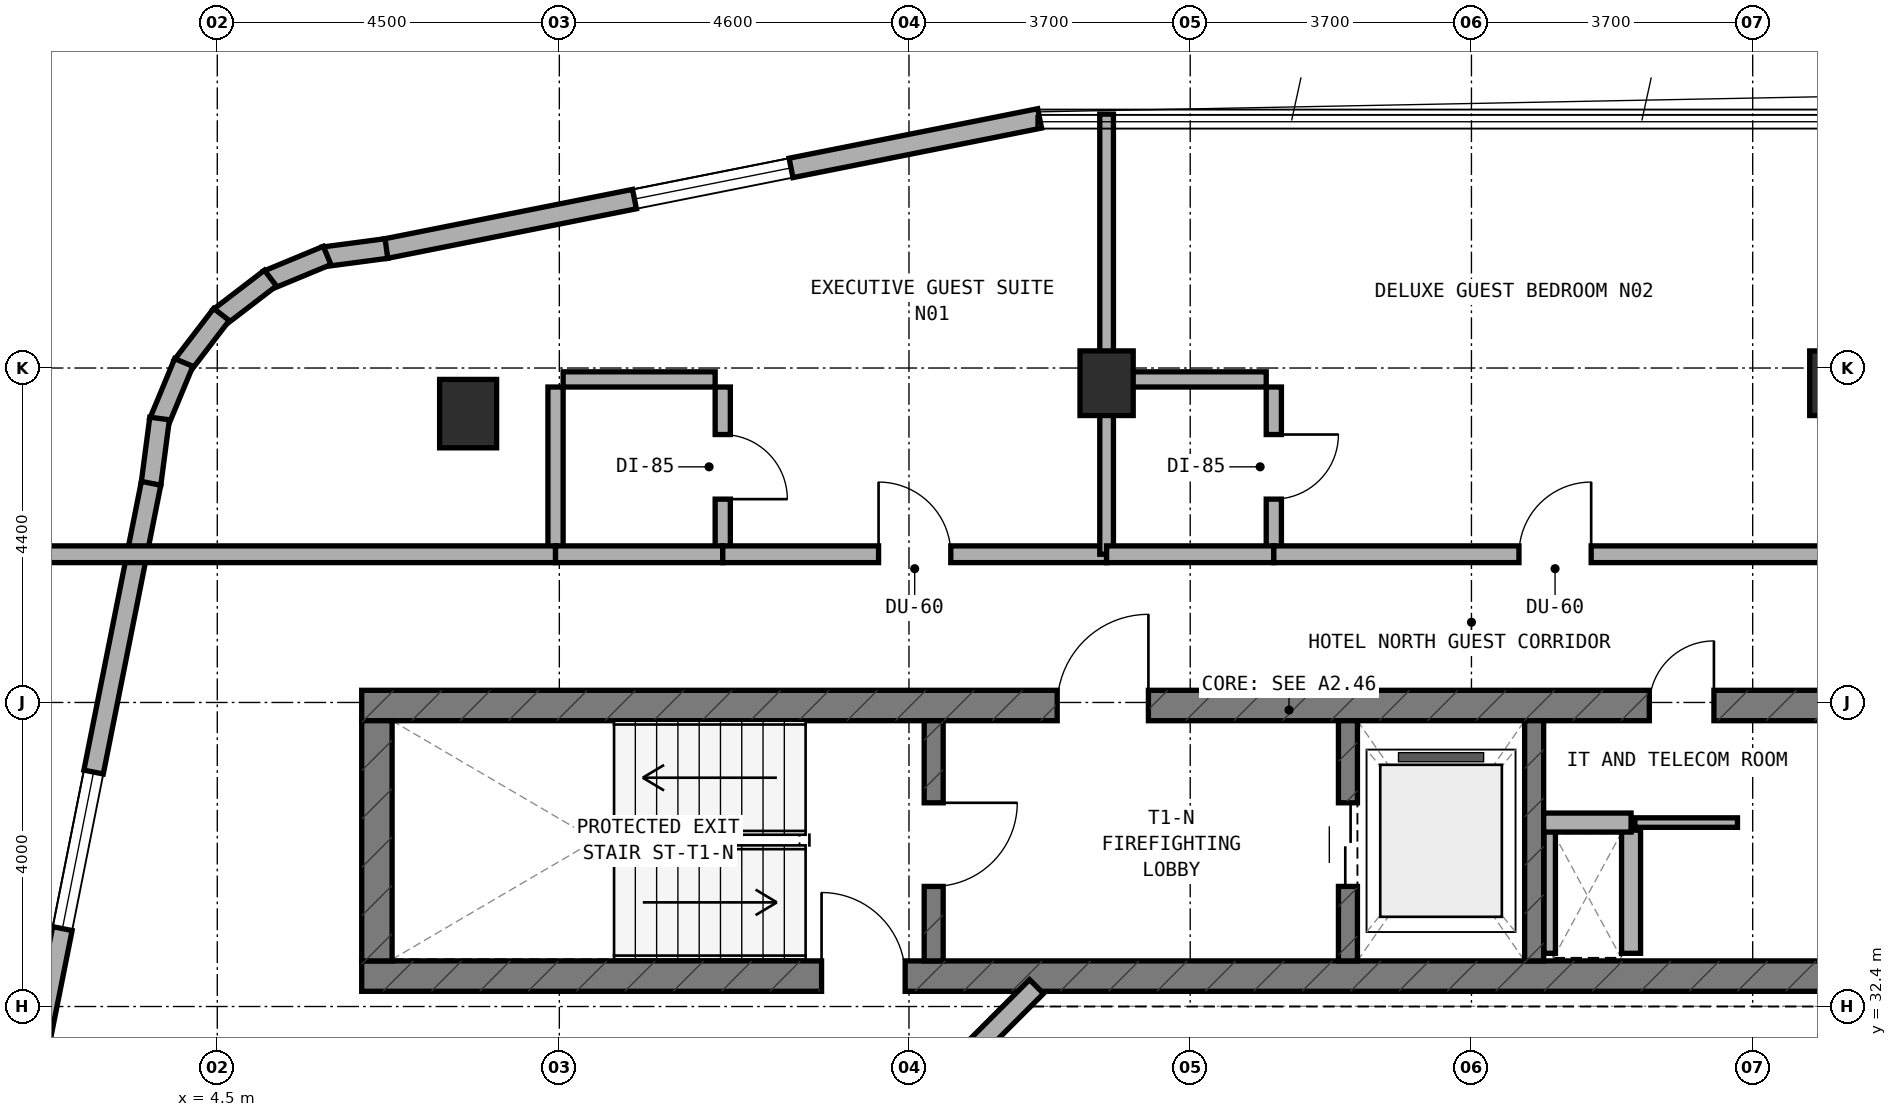
"""IFC4 building model, lengths in metres.
Left out: names, types, materials, properties, quantities, classifications, styles, units other than length and angle.
Written with IfcOpenShell. Run it as: python <this file> out.ifc"""

import sys

from ifc_helpers import new_model, si_unit, direction, frame, frame_2d, origin, origin_2d, place, context, subcontext, project, spatial, rectangle, extrude, element, fill, save


model = new_model("IFC4")
c1 = context("Model", 3, precision=1e-05, world=origin(), true_north=direction((0.0, 1.0)))
c2 = subcontext(c1, "Body", "Model", "MODEL_VIEW")
j1 = project(units=[si_unit("LENGTHUNIT", "METRE"), si_unit("PLANEANGLEUNIT", "RADIAN")], contexts=[c1])
p1 = place(None, origin())
s1 = spatial("IfcSite", under=j1, at=p1, CompositionType="ELEMENT")
p2 = place(p1, origin())
s2 = spatial("IfcBuilding", under=s1, at=p2, CompositionType="ELEMENT")
p3 = place(p2, frame((0.0, 0.0, 217.1)))
s3 = spatial("IfcBuildingStorey", under=s2, at=p3, CompositionType="ELEMENT", Elevation=217.1)
p4 = place(p3, frame((6.4, 32.8, 0.0), z_axis=(0.0, 0.0, 1.0), x_axis=(1.0, 0.0, 0.0)))
e1 = element("IfcWall", 1, at=p4, inside=s3, PredefinedType="SHEAR", context=c2, shape_type="SweptSolid", body=[
    extrude(rectangle(XDim=24.4, YDim=0.4, at=frame_2d((12.2, 0.0))), origin(), (0.0, 0.0, 1.0), 3.6),
])
p5 = place(p4, frame((6.05, 0.0, 0.0)))
e2 = element("IfcOpeningElement", 2, at=p5, cuts=e1, PredefinedType="OPENING", context=c2, shape_type="SweptSolid", body=[
    extrude(rectangle(XDim=1.1, YDim=2.15, at=frame_2d((0.55, 1.075))), frame((0.0, 0.21, 0.0), z_axis=(0.0, -1.0, 0.0), x_axis=(1.0, 0.0, 0.0)), (0.0, 0.0, 1.0), 0.42),
])
p6 = place(p3, frame((6.4, 36.36, 0.0), z_axis=(0.0, 0.0, 1.0), x_axis=(1.0, 0.0, 0.0)))
e3 = element("IfcWall", 3, at=p6, inside=s3, PredefinedType="SHEAR", context=c2, shape_type="SweptSolid", body=[
    extrude(rectangle(XDim=24.4, YDim=0.4, at=frame_2d((12.2, 0.0))), origin(), (0.0, 0.0, 1.0), 3.6),
])
p7 = place(p6, frame((9.15, 0.0, 0.0)))
e4 = element("IfcOpeningElement", 4, at=p7, cuts=e3, PredefinedType="OPENING", context=c2, shape_type="SweptSolid", body=[
    extrude(rectangle(XDim=1.2, YDim=2.15, at=frame_2d((0.6, 1.075))), frame((0.0, 0.21, 0.0), z_axis=(0.0, -1.0, 0.0), x_axis=(1.0, 0.0, 0.0)), (0.0, 0.0, 1.0), 0.42),
])
p8 = place(p6, frame((19.2, 0.0, 0.0)))
e5 = element("IfcOpeningElement", 5, at=p8, cuts=e3, PredefinedType="OPENING", context=c2, shape_type="SweptSolid", body=[
    extrude(rectangle(XDim=0.85, YDim=2.1, at=frame_2d((0.425, 1.05))), frame((0.0, 0.21, 0.0), z_axis=(0.0, -1.0, 0.0), x_axis=(1.0, 0.0, 0.0)), (0.0, 0.0, 1.0), 0.42),
])
p9 = place(p6, frame((16.94, 0.0, 0.0)))
e6 = element("IfcOpeningElement", 6, at=p9, cuts=e3, PredefinedType="OPENING", context=c2, shape_type="SweptSolid", body=[
    extrude(rectangle(XDim=0.85, YDim=2.1, at=frame_2d((0.425, 1.05))), frame((0.0, 0.21, 0.0), z_axis=(0.0, -1.0, 0.0), x_axis=(1.0, 0.0, 0.0)), (0.0, 0.0, 1.0), 0.42),
])
p10 = place(p3, frame((6.6, 33.0, 0.0), z_axis=(0.0, 0.0, 1.0), x_axis=(0.0, 1.0, 0.0)))
e7 = element("IfcWall", 7, at=p10, inside=s3, PredefinedType="SHEAR", context=c2, shape_type="SweptSolid", body=[
    extrude(rectangle(XDim=3.16, YDim=0.4, at=frame_2d((1.58, 0.0))), origin(), (0.0, 0.0, 1.0), 3.6),
])
p11 = place(p3, frame((13.925, 33.0, 0.0), z_axis=(0.0, 0.0, 1.0), x_axis=(0.0, 1.0, 0.0)))
e8 = element("IfcWall", 8, at=p11, inside=s3, PredefinedType="STANDARD", context=c2, shape_type="SweptSolid", body=[
    extrude(rectangle(XDim=3.16, YDim=0.25, at=frame_2d((1.58, 0.0))), origin(), (0.0, 0.0, 1.0), 3.32),
])
p12 = place(p11, frame((0.98, 0.0, 0.0)))
e9 = element("IfcOpeningElement", 9, at=p12, cuts=e8, PredefinedType="OPENING", context=c2, shape_type="SweptSolid", body=[
    extrude(rectangle(XDim=1.1, YDim=2.15, at=frame_2d((0.55, 1.075))), frame((0.0, 0.135, 0.0), z_axis=(0.0, -1.0, 0.0), x_axis=(1.0, 0.0, 0.0)), (0.0, 0.0, 1.0), 0.27),
])
p13 = place(p3, frame((19.375, 33.0, 0.0), z_axis=(0.0, 0.0, 1.0), x_axis=(0.0, 1.0, 0.0)))
e10 = element("IfcWall", 10, at=p13, inside=s3, PredefinedType="STANDARD", context=c2, shape_type="SweptSolid", body=[
    extrude(rectangle(XDim=3.16, YDim=0.25, at=frame_2d((1.58, 0.0))), origin(), (0.0, 0.0, 1.0), 3.32),
])
p14 = place(p13, frame((0.98, 0.0, 0.0)))
e11 = element("IfcOpeningElement", 11, at=p14, cuts=e10, PredefinedType="OPENING", context=c2, shape_type="SweptSolid", body=[
    extrude(rectangle(XDim=1.1, YDim=2.15, at=frame_2d((0.55, 1.075))), frame((0.0, 0.135, 0.0), z_axis=(0.0, -1.0, 0.0), x_axis=(1.0, 0.0, 0.0)), (0.0, 0.0, 1.0), 0.27),
])
p15 = place(p3, frame((21.825, 33.0, 0.0), z_axis=(0.0, 0.0, 1.0), x_axis=(0.0, 1.0, 0.0)))
e12 = element("IfcWall", 12, at=p15, inside=s3, PredefinedType="STANDARD", context=c2, shape_type="SweptSolid", body=[
    extrude(rectangle(XDim=3.16, YDim=0.25, at=frame_2d((1.58, 0.0))), origin(), (0.0, 0.0, 1.0), 3.32),
])
for number, where, z_axis, x_axis in (
    (13, (16.2, 40.6, 0.0), (0.0, 0.0, 1.0), (1.0, 0.0, 0.0)),
    (14, (25.8, 40.6, 0.0), (0.0, 0.0, 1.0), (1.0, 0.0, 0.0)),
):
    element("IfcColumn", number, at=place(p3, frame(where, z_axis=z_axis, x_axis=x_axis)), inside=s3, PredefinedType="COLUMN", context=c2, shape_type="SweptSolid", body=[
        extrude(rectangle(XDim=0.7, YDim=0.85, at=origin_2d()), origin(), (0.0, 0.0, 1.0), 3.6),
    ])
p16 = place(p3, frame((7.8, 40.2, 0.0), z_axis=(0.0, 0.0, 1.0), x_axis=(1.0, 0.0, 0.0)))
e15 = element("IfcColumn", 15, at=p16, inside=s3, PredefinedType="COLUMN", context=c2, shape_type="SweptSolid", body=[
    extrude(rectangle(XDim=0.75, YDim=0.9, at=origin_2d()), origin(), (0.0, 0.0, 1.0), 3.6),
])
p17 = place(p3, frame((15.319, 44.084, 0.0), z_axis=(0.0, 0.0, 1.0), x_axis=(-0.980745199176, -0.195291715883, 0.0)))
e16 = element("IfcWall", 16, at=p17, inside=s3, PredefinedType="STANDARD", context=c2, shape_type="SweptSolid", body=[
    extrude(rectangle(XDim=8.771, YDim=0.26, at=frame_2d((4.385, 0.0))), origin(), (0.0, 0.0, 1.0), 3.32),
])
p18 = place(p17, frame((3.335, 0.0, 0.85)))
e17 = element("IfcOpeningElement", 17, at=p18, cuts=e16, PredefinedType="OPENING", context=c2, shape_type="SweptSolid", body=[
    extrude(rectangle(XDim=2.1, YDim=1.5, at=frame_2d((1.05, 0.75))), frame((0.0, 0.14, 0.0), z_axis=(0.0, -1.0, 0.0), x_axis=(1.0, 0.0, 0.0)), (0.0, 0.0, 1.0), 0.28),
])
p19 = place(p3, frame((6.725, 42.372, 0.0), z_axis=(0.0, 0.0, 1.0), x_axis=(-0.9913883573, -0.130954667764, 0.0)))
e18 = element("IfcWall", 18, at=p19, inside=s3, PredefinedType="STANDARD", context=c2, shape_type="SweptSolid", body=[
    extrude(rectangle(XDim=0.833, YDim=0.26, at=frame_2d((0.417, 0.0))), origin(), (0.0, 0.0, 1.0), 3.32),
])
p20 = place(p3, frame((5.945, 42.281, 0.0), z_axis=(0.0, 0.0, 1.0), x_axis=(-0.923754491172, -0.382985169477, 0.0)))
e19 = element("IfcWall", 19, at=p20, inside=s3, PredefinedType="STANDARD", context=c2, shape_type="SweptSolid", body=[
    extrude(rectangle(XDim=0.851, YDim=0.26, at=frame_2d((0.426, 0.0))), origin(), (0.0, 0.0, 1.0), 3.32),
])
for number, where, z_axis, x_axis in (
    (20, (5.199, 41.983, 0.0), (0.0, 0.0, 1.0), (-0.794, -0.608, 0.0)),
    (21, (4.555, 41.504, 0.0), (0.0, 0.0, 1.0), (-0.608, -0.794, 0.0)),
):
    element("IfcWall", number, at=place(p3, frame(where, z_axis=z_axis, x_axis=x_axis)), inside=s3, PredefinedType="STANDARD", context=c2, shape_type="SweptSolid", body=[
        extrude(rectangle(XDim=0.85, YDim=0.26, at=frame_2d((0.425, 0.0))), origin(), (0.0, 0.0, 1.0), 3.32),
    ])
p21 = place(p3, frame((4.059, 40.873, 0.0), z_axis=(0.0, 0.0, 1.0), x_axis=(-0.383229930484, -0.923652976167, 0.0)))
e22 = element("IfcWall", 22, at=p21, inside=s3, PredefinedType="STANDARD", context=c2, shape_type="SweptSolid", body=[
    extrude(rectangle(XDim=0.851, YDim=0.26, at=frame_2d((0.426, 0.0))), origin(), (0.0, 0.0, 1.0), 3.32),
])
p22 = place(p3, frame((3.741, 40.136, 0.0), z_axis=(0.0, 0.0, 1.0), x_axis=(-0.130156359936, -0.991493480548, 0.0)))
e23 = element("IfcWall", 23, at=p22, inside=s3, PredefinedType="STANDARD", context=c2, shape_type="SweptSolid", body=[
    extrude(rectangle(XDim=0.868, YDim=0.26, at=frame_2d((0.434, 0.0))), origin(), (0.0, 0.0, 1.0), 3.32),
])
p23 = place(p3, frame((3.629, 39.283, 0.0), z_axis=(0.0, 0.0, 1.0), x_axis=(-0.195291715883, -0.980745199176, 0.0)))
e24 = element("IfcWall", 24, at=p23, inside=s3, PredefinedType="STANDARD", context=c2, shape_type="SweptSolid", body=[
    extrude(rectangle(XDim=8.771, YDim=0.26, at=frame_2d((4.385, 0.0))), origin(), (0.0, 0.0, 1.0), 3.32),
])
p24 = place(p23, frame((3.873, 0.0, 0.85)))
e25 = element("IfcOpeningElement", 25, at=p24, cuts=e24, PredefinedType="OPENING", context=c2, shape_type="SweptSolid", body=[
    extrude(rectangle(XDim=2.1, YDim=1.5, at=frame_2d((1.05, 0.75))), frame((0.0, 0.14, 0.0), z_axis=(0.0, -1.0, 0.0), x_axis=(1.0, 0.0, 0.0)), (0.0, 0.0, 1.0), 0.28),
])
p25 = place(p3, frame((15.278, 32.662, 0.0), z_axis=(0.0, 0.0, 1.0), x_axis=(-0.707059717605, -0.707153841636, 0.0)))
e26 = element("IfcWall", 26, at=p25, inside=s3, PredefinedType="STANDARD", context=c2, shape_type="SweptSolid", body=[
    extrude(rectangle(XDim=2.594, YDim=0.26, at=frame_2d((1.297, 0.0))), origin(), (0.0, 0.0, 1.0), 3.32),
])
p26 = place(p3, frame((22.03, 33.1, 0.0), z_axis=(0.0, 0.0, 1.0), x_axis=(0.0, 1.0, 0.0)))
e27 = element("IfcWall", 27, at=p26, inside=s3, PredefinedType="PARTITIONING", context=c2, shape_type="SweptSolid", body=[
    extrude(rectangle(XDim=1.62, YDim=0.15, at=frame_2d((0.81, 0.0))), origin(), (0.0, 0.0, 1.0), 3.32),
])
p27 = place(p3, frame((23.1, 33.1, 0.0), z_axis=(0.0, 0.0, 1.0), x_axis=(0.0, 1.0, 0.0)))
e28 = element("IfcWall", 28, at=p27, inside=s3, PredefinedType="SOLIDWALL", context=c2, shape_type="SweptSolid", body=[
    extrude(rectangle(XDim=1.62, YDim=0.25, at=frame_2d((0.81, 0.0))), origin(), (0.0, 0.0, 1.0), 3.32),
])
p28 = place(p3, frame((21.95, 34.82, 0.0), z_axis=(0.0, 0.0, 1.0), x_axis=(1.0, 0.0, 0.0)))
e29 = element("IfcWall", 29, at=p28, inside=s3, PredefinedType="SOLIDWALL", context=c2, shape_type="SweptSolid", body=[
    extrude(rectangle(XDim=1.15, YDim=0.25, at=frame_2d((0.575, 0.0))), origin(), (0.0, 0.0, 1.0), 3.32),
])
p29 = place(p3, frame((23.15, 34.82, 0.0), z_axis=(0.0, 0.0, 1.0), x_axis=(1.0, 0.0, 0.0)))
e30 = element("IfcWall", 30, at=p29, inside=s3, PredefinedType="PARTITIONING", context=c2, shape_type="SweptSolid", body=[
    extrude(rectangle(XDim=1.35, YDim=0.125, at=frame_2d((0.675, 0.0))), origin(), (0.0, 0.0, 1.0), 3.32),
])
p30 = place(p3, frame((11.15, 38.45, 0.0), z_axis=(0.0, 0.0, 1.0), x_axis=(0.0, 1.0, 0.0)))
e31 = element("IfcWall", 31, at=p30, inside=s3, PredefinedType="PLUMBINGWALL", context=c2, shape_type="SweptSolid", body=[
    extrude(rectangle(XDim=2.1, YDim=0.2, at=frame_2d((1.05, 0.0))), origin(), (0.0, 0.0, 1.0), 2.995),
])
p31 = place(p30, frame((0.625, 0.0, 0.0)))
e32 = element("IfcOpeningElement", 32, at=p31, cuts=e31, PredefinedType="OPENING", context=c2, shape_type="SweptSolid", body=[
    extrude(rectangle(XDim=0.85, YDim=2.1, at=frame_2d((0.425, 1.05))), frame((0.0, 0.11, 0.0), z_axis=(0.0, -1.0, 0.0), x_axis=(1.0, 0.0, 0.0)), (0.0, 0.0, 1.0), 0.22),
])
p32 = place(p3, frame((9.05, 40.65, 0.0), z_axis=(0.0, 0.0, 1.0), x_axis=(1.0, 0.0, 0.0)))
e33 = element("IfcWall", 33, at=p32, inside=s3, PredefinedType="PLUMBINGWALL", context=c2, shape_type="SweptSolid", body=[
    extrude(rectangle(XDim=2.0, YDim=0.2, at=frame_2d((1.0, 0.0))), origin(), (0.0, 0.0, 1.0), 3.32),
])
p33 = place(p3, frame((8.95, 38.45, 0.0), z_axis=(0.0, 0.0, 1.0), x_axis=(0.0, 1.0, 0.0)))
e34 = element("IfcWall", 34, at=p33, inside=s3, PredefinedType="PLUMBINGWALL", context=c2, shape_type="SweptSolid", body=[
    extrude(rectangle(XDim=2.1, YDim=0.2, at=frame_2d((1.05, 0.0))), origin(), (0.0, 0.0, 1.0), 2.995),
])
p34 = place(p3, frame((1.96, 38.35, 0.0), z_axis=(0.0, 0.0, 1.0), x_axis=(1.0, 0.0, 0.0)))
e35 = element("IfcWall", 35, at=p34, inside=s3, PredefinedType="SOLIDWALL", context=c2, shape_type="SweptSolid", body=[
    extrude(rectangle(XDim=6.99, YDim=0.22, at=frame_2d((3.495, 0.0))), origin(), (0.0, 0.0, 1.0), 2.695),
])
p35 = place(p3, frame((8.95, 38.35, 0.0), z_axis=(0.0, 0.0, 1.0), x_axis=(1.0, 0.0, 0.0)))
e36 = element("IfcWall", 36, at=p35, inside=s3, PredefinedType="SOLIDWALL", context=c2, shape_type="SweptSolid", body=[
    extrude(rectangle(XDim=2.2, YDim=0.22, at=frame_2d((1.1, 0.0))), origin(), (0.0, 0.0, 1.0), 3.32),
])
p36 = place(p3, frame((11.15, 38.35, 0.0), z_axis=(0.0, 0.0, 1.0), x_axis=(1.0, 0.0, 0.0)))
e37 = element("IfcWall", 37, at=p36, inside=s3, PredefinedType="SOLIDWALL", context=c2, shape_type="SweptSolid", body=[
    extrude(rectangle(XDim=5.05, YDim=0.22, at=frame_2d((2.525, 0.0))), origin(), (0.0, 0.0, 1.0), 2.695),
])
p37 = place(p36, frame((2.05, 0.0, 0.0)))
e38 = element("IfcOpeningElement", 38, at=p37, cuts=e37, PredefinedType="OPENING", context=c2, shape_type="SweptSolid", body=[
    extrude(rectangle(XDim=0.95, YDim=2.1, at=frame_2d((0.475, 1.05))), frame((0.0, 0.12, 0.0), z_axis=(0.0, -1.0, 0.0), x_axis=(1.0, 0.0, 0.0)), (0.0, 0.0, 1.0), 0.24),
])
p38 = place(p3, frame((16.2, 38.35, 0.0), z_axis=(0.0, 0.0, 1.0), x_axis=(0.0, 1.0, 0.0)))
e39 = element("IfcWall", 39, at=p38, inside=s3, PredefinedType="SOLIDWALL", context=c2, shape_type="SweptSolid", body=[
    extrude(rectangle(XDim=5.79, YDim=0.18, at=frame_2d((2.895, 0.0))), origin(), (0.0, 0.0, 1.0), 2.695),
])
p39 = place(p3, frame((18.4, 38.45, 0.0), z_axis=(0.0, 0.0, 1.0), x_axis=(0.0, 1.0, 0.0)))
e40 = element("IfcWall", 40, at=p39, inside=s3, PredefinedType="PLUMBINGWALL", context=c2, shape_type="SweptSolid", body=[
    extrude(rectangle(XDim=2.1, YDim=0.2, at=frame_2d((1.05, 0.0))), origin(), (0.0, 0.0, 1.0), 2.995),
])
p40 = place(p39, frame((0.625, 0.0, 0.0)))
e41 = element("IfcOpeningElement", 41, at=p40, cuts=e40, PredefinedType="OPENING", context=c2, shape_type="SweptSolid", body=[
    extrude(rectangle(XDim=0.85, YDim=2.1, at=frame_2d((0.425, 1.05))), frame((0.0, 0.11, 0.0), z_axis=(0.0, -1.0, 0.0), x_axis=(1.0, 0.0, 0.0)), (0.0, 0.0, 1.0), 0.22),
])
p41 = place(p3, frame((16.3, 40.65, 0.0), z_axis=(0.0, 0.0, 1.0), x_axis=(1.0, 0.0, 0.0)))
e42 = element("IfcWall", 42, at=p41, inside=s3, PredefinedType="PLUMBINGWALL", context=c2, shape_type="SweptSolid", body=[
    extrude(rectangle(XDim=2.0, YDim=0.2, at=frame_2d((1.0, 0.0))), origin(), (0.0, 0.0, 1.0), 3.015),
])
p42 = place(p3, frame((16.2, 38.35, 0.0), z_axis=(0.0, 0.0, 1.0), x_axis=(1.0, 0.0, 0.0)))
e43 = element("IfcWall", 43, at=p42, inside=s3, PredefinedType="SOLIDWALL", context=c2, shape_type="SweptSolid", body=[
    extrude(rectangle(XDim=2.2, YDim=0.22, at=frame_2d((1.1, 0.0))), origin(), (0.0, 0.0, 1.0), 2.695),
])
p43 = place(p3, frame((18.4, 38.35, 0.0), z_axis=(0.0, 0.0, 1.0), x_axis=(1.0, 0.0, 0.0)))
e44 = element("IfcWall", 44, at=p43, inside=s3, PredefinedType="SOLIDWALL", context=c2, shape_type="SweptSolid", body=[
    extrude(rectangle(XDim=7.4, YDim=0.22, at=frame_2d((3.7, 0.0))), origin(), (0.0, 0.0, 1.0), 2.695),
])
p44 = place(p43, frame((3.225, 0.0, 0.0)))
e45 = element("IfcOpeningElement", 45, at=p44, cuts=e44, PredefinedType="OPENING", context=c2, shape_type="SweptSolid", body=[
    extrude(rectangle(XDim=0.95, YDim=2.1, at=frame_2d((0.475, 1.05))), frame((0.0, 0.12, 0.0), z_axis=(0.0, -1.0, 0.0), x_axis=(1.0, 0.0, 0.0)), (0.0, 0.0, 1.0), 0.24),
])
p45 = place(p18, origin())
e46 = element("IfcWindow", 46, at=p45, inside=s3, PartitioningType="SINGLE_PANEL", PredefinedType="WINDOW", context=c2, shape_type="SweptSolid", body=[
    extrude(rectangle(XDim=2.1, YDim=1.5, at=frame_2d((1.05, 0.75))), frame((0.0, 0.03, 0.0), z_axis=(0.0, -1.0, 0.0), x_axis=(1.0, 0.0, 0.0)), (0.0, 0.0, 1.0), 0.06),
])
fill(e17, e46)
p46 = place(p24, origin())
e47 = element("IfcWindow", 47, at=p46, inside=s3, PartitioningType="SINGLE_PANEL", PredefinedType="WINDOW", context=c2, shape_type="SweptSolid", body=[
    extrude(rectangle(XDim=2.1, YDim=1.5, at=frame_2d((1.05, 0.75))), frame((0.0, 0.03, 0.0), z_axis=(0.0, -1.0, 0.0), x_axis=(1.0, 0.0, 0.0)), (0.0, 0.0, 1.0), 0.06),
])
fill(e25, e47)
p47 = place(p12, frame((1.1, 0.0, 0.0), z_axis=(0.0, 0.0, 1.0), x_axis=(-1.0, 0.0, 0.0)))
e48 = element("IfcDoor", 48, at=p47, inside=s3, OperationType="SINGLE_SWING_LEFT", PredefinedType="DOOR", context=c2, shape_type="SweptSolid", body=[
    extrude(rectangle(XDim=1.1, YDim=2.15, at=frame_2d((0.55, 1.075))), frame((0.0, 0.025, 0.0), z_axis=(0.0, -1.0, 0.0), x_axis=(1.0, 0.0, 0.0)), (0.0, 0.0, 1.0), 0.05),
])
fill(e9, e48)
p48 = place(p7, origin())
e49 = element("IfcDoor", 49, at=p48, inside=s3, OperationType="SINGLE_SWING_RIGHT", PredefinedType="DOOR", context=c2, shape_type="SweptSolid", body=[
    extrude(rectangle(XDim=1.2, YDim=2.15, at=frame_2d((0.6, 1.075))), frame((0.0, 0.025, 0.0), z_axis=(0.0, -1.0, 0.0), x_axis=(1.0, 0.0, 0.0)), (0.0, 0.0, 1.0), 0.05),
])
fill(e4, e49)
p49 = place(p14, origin())
e50 = element("IfcDoor", 50, at=p49, inside=s3, OperationType="DOUBLE_DOOR_SLIDING", PredefinedType="DOOR", context=c2, shape_type="SweptSolid", body=[
    extrude(rectangle(XDim=1.1, YDim=2.15, at=frame_2d((0.55, 1.075))), frame((0.0, 0.025, 0.0), z_axis=(0.0, -1.0, 0.0), x_axis=(1.0, 0.0, 0.0)), (0.0, 0.0, 1.0), 0.05),
])
fill(e11, e50)
p50 = place(p9, origin())
e51 = element("IfcDoor", 51, at=p50, inside=s3, OperationType="SINGLE_SWING_RIGHT", PredefinedType="DOOR", context=c2, shape_type="SweptSolid", body=[
    extrude(rectangle(XDim=0.85, YDim=2.1, at=frame_2d((0.425, 1.05))), frame((0.0, 0.025, 0.0), z_axis=(0.0, -1.0, 0.0), x_axis=(1.0, 0.0, 0.0)), (0.0, 0.0, 1.0), 0.05),
])
fill(e6, e51)
p51 = place(p5, origin())
e52 = element("IfcDoor", 52, at=p51, inside=s3, OperationType="SINGLE_SWING_LEFT", PredefinedType="DOOR", context=c2, shape_type="SweptSolid", body=[
    extrude(rectangle(XDim=1.1, YDim=2.15, at=frame_2d((0.55, 1.075))), frame((0.0, 0.025, 0.0), z_axis=(0.0, -1.0, 0.0), x_axis=(1.0, 0.0, 0.0)), (0.0, 0.0, 1.0), 0.05),
])
fill(e2, e52)
p52 = place(p31, frame((0.85, 0.0, 0.0), z_axis=(0.0, 0.0, 1.0), x_axis=(-1.0, 0.0, 0.0)))
e53 = element("IfcDoor", 53, at=p52, inside=s3, OperationType="SINGLE_SWING_RIGHT", PredefinedType="DOOR", context=c2, shape_type="SweptSolid", body=[
    extrude(rectangle(XDim=0.85, YDim=2.1, at=frame_2d((0.425, 1.05))), frame((0.0, 0.025, 0.0), z_axis=(0.0, -1.0, 0.0), x_axis=(1.0, 0.0, 0.0)), (0.0, 0.0, 1.0), 0.05),
])
fill(e32, e53)
p53 = place(p37, origin())
e54 = element("IfcDoor", 54, at=p53, inside=s3, OperationType="SINGLE_SWING_LEFT", PredefinedType="DOOR", context=c2, shape_type="SweptSolid", body=[
    extrude(rectangle(XDim=0.95, YDim=2.1, at=frame_2d((0.475, 1.05))), frame((0.0, 0.025, 0.0), z_axis=(0.0, -1.0, 0.0), x_axis=(1.0, 0.0, 0.0)), (0.0, 0.0, 1.0), 0.05),
])
fill(e38, e54)
p54 = place(p40, frame((0.85, 0.0, 0.0), z_axis=(0.0, 0.0, 1.0), x_axis=(-1.0, 0.0, 0.0)))
e55 = element("IfcDoor", 55, at=p54, inside=s3, OperationType="SINGLE_SWING_LEFT", PredefinedType="DOOR", context=c2, shape_type="SweptSolid", body=[
    extrude(rectangle(XDim=0.85, YDim=2.1, at=frame_2d((0.425, 1.05))), frame((0.0, 0.025, 0.0), z_axis=(0.0, -1.0, 0.0), x_axis=(1.0, 0.0, 0.0)), (0.0, 0.0, 1.0), 0.05),
])
fill(e41, e55)
p55 = place(p44, origin())
e56 = element("IfcDoor", 56, at=p55, inside=s3, OperationType="SINGLE_SWING_RIGHT", PredefinedType="DOOR", context=c2, shape_type="SweptSolid", body=[
    extrude(rectangle(XDim=0.95, YDim=2.1, at=frame_2d((0.475, 1.05))), frame((0.0, 0.025, 0.0), z_axis=(0.0, -1.0, 0.0), x_axis=(1.0, 0.0, 0.0)), (0.0, 0.0, 1.0), 0.05),
])
fill(e45, e56)
save(model, sys.argv[1])
